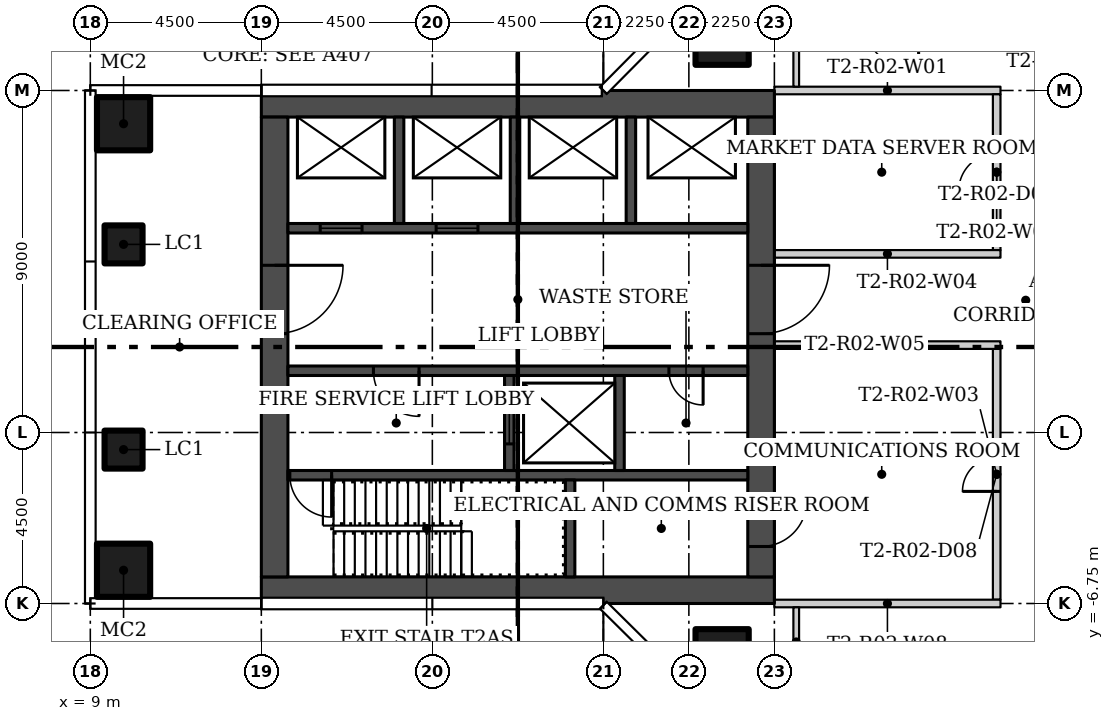
"""IFC4 building model, lengths in metres.
Left out: names, types, materials, properties, quantities, classifications, styles, units other than length and angle.
Written with IfcOpenShell. Run it as: python <this file> out.ifc"""

import sys

from ifc_helpers import new_model, si_unit, direction, frame, frame_2d, origin, origin_2d, place, context, subcontext, project, spatial, rectangle, hollow_rectangle, extrude, element, fill, save


model = new_model("IFC4")
c1 = context("Model", 3, precision=1e-05, world=origin(), true_north=direction((0.0, 1.0)))
c2 = subcontext(c1, "Body", "Model", "MODEL_VIEW")
j1 = project(units=[si_unit("LENGTHUNIT", "METRE"), si_unit("PLANEANGLEUNIT", "RADIAN")], contexts=[c1])
p1 = place(None, origin())
s1 = spatial("IfcSite", under=j1, at=p1, CompositionType="ELEMENT")
p2 = place(p1, origin())
s2 = spatial("IfcBuilding", under=s1, at=p2, CompositionType="ELEMENT")
p3 = place(p2, frame((0.0, 0.0, 33.0)))
s3 = spatial("IfcBuildingStorey", under=s2, at=p3, CompositionType="ELEMENT", Elevation=33.0)
for number, where in (
    (1, (25.625, 8.125, 0.0)),
    (2, (25.625, -8.125, 0.0)),
    (3, (9.875, -5.875, 0.0)),
    (4, (9.875, 5.875, 0.0)),
):
    element("IfcColumn", number, at=place(p3, frame(where)), inside=s3, PredefinedType="COLUMN", context=c2, shape_type="SweptSolid", body=[
        extrude(hollow_rectangle(XDim=1.4, YDim=1.4, WallThickness=0.05, at=origin_2d()), origin(), (0.0, 0.0, 1.0), 4.15),
    ])
for number, where in (
    (5, (9.875, -2.7, 0.0)),
    (6, (9.875, 2.7, 0.0)),
):
    element("IfcColumn", number, at=place(p3, frame(where)), inside=s3, PredefinedType="COLUMN", context=c2, shape_type="SweptSolid", body=[
        extrude(hollow_rectangle(XDim=1.0, YDim=1.0, WallThickness=0.04, at=origin_2d()), origin(), (0.0, 0.0, 1.0), 4.15),
    ])
p4 = place(p3, frame((32.95, 6.75, 0.0), z_axis=(0.0, 0.0, 1.0), x_axis=(-1.0, 0.0, 0.0)))
e7 = element("IfcWall", 7, at=p4, inside=s3, PredefinedType="PARTITIONING", context=c2, shape_type="SweptSolid", body=[
    extrude(rectangle(XDim=5.95, YDim=0.2, at=frame_2d((2.975, 0.0))), origin(), (0.0, 0.0, 1.0), 4.15),
])
p5 = place(p3, frame((32.85, 2.55, 0.0), z_axis=(0.0, 0.0, 1.0), x_axis=(0.0, 1.0, 0.0)))
e8 = element("IfcWall", 8, at=p5, inside=s3, PredefinedType="PARTITIONING", context=c2, shape_type="SweptSolid", body=[
    extrude(rectangle(XDim=4.1, YDim=0.2, at=frame_2d((2.05, 0.0))), origin(), (0.0, 0.0, 1.0), 4.15),
])
p6 = place(p5, frame((1.55, 0.0, 0.0)))
e9 = element("IfcOpeningElement", 9, at=p6, cuts=e8, PredefinedType="OPENING", context=c2, shape_type="SweptSolid", body=[
    extrude(rectangle(XDim=1.0, YDim=2.1, at=frame_2d((0.5, 1.05))), frame((0.0, 0.11, 0.0), z_axis=(0.0, -1.0, 0.0), x_axis=(1.0, 0.0, 0.0)), (0.0, 0.0, 1.0), 0.22),
])
p7 = place(p3, frame((32.85, -6.65, 0.0), z_axis=(0.0, 0.0, 1.0), x_axis=(0.0, 1.0, 0.0)))
e10 = element("IfcWall", 10, at=p7, inside=s3, PredefinedType="PARTITIONING", context=c2, shape_type="SweptSolid", body=[
    extrude(rectangle(XDim=6.6, YDim=0.2, at=frame_2d((3.3, 0.0))), origin(), (0.0, 0.0, 1.0), 4.15),
])
p8 = place(p7, frame((2.85, 0.0, 0.0)))
e11 = element("IfcOpeningElement", 11, at=p8, cuts=e10, PredefinedType="OPENING", context=c2, shape_type="SweptSolid", body=[
    extrude(rectangle(XDim=0.9, YDim=2.1, at=frame_2d((0.45, 1.05))), frame((0.0, 0.11, 0.0), z_axis=(0.0, -1.0, 0.0), x_axis=(1.0, 0.0, 0.0)), (0.0, 0.0, 1.0), 0.22),
])
p9 = place(p3, frame((27.0, 2.45, 0.0)))
e12 = element("IfcWall", 12, at=p9, inside=s3, PredefinedType="PARTITIONING", context=c2, shape_type="SweptSolid", body=[
    extrude(rectangle(XDim=5.95, YDim=0.2, at=frame_2d((2.975, 0.0))), origin(), (0.0, 0.0, 1.0), 4.15),
])
p10 = place(p3, frame((32.95, 0.05, 0.0), z_axis=(0.0, 0.0, 1.0), x_axis=(-1.0, 0.0, 0.0)))
e13 = element("IfcWall", 13, at=p10, inside=s3, PredefinedType="PARTITIONING", context=c2, shape_type="SweptSolid", body=[
    extrude(rectangle(XDim=5.95, YDim=0.2, at=frame_2d((2.975, 0.0))), origin(), (0.0, 0.0, 1.0), 4.15),
])
p11 = place(p3, frame((27.0, -6.75, 0.0)))
e14 = element("IfcWall", 14, at=p11, inside=s3, PredefinedType="PARTITIONING", context=c2, shape_type="SweptSolid", body=[
    extrude(rectangle(XDim=5.95, YDim=0.2, at=frame_2d((2.975, 0.0))), origin(), (0.0, 0.0, 1.0), 4.15),
])
for number, where, z_axis, x_axis in (
    (15, (27.575, -6.85, 0.0), (0.0, 0.0, 1.0), (0.0, -1.0, 0.0)),
    (16, (27.575, 8.675, 0.0), (0.0, 0.0, 1.0), (0.0, -1.0, 0.0)),
):
    element("IfcWall", number, at=place(p3, frame(where, z_axis=z_axis, x_axis=x_axis)), inside=s3, PredefinedType="PARTITIONING", context=c2, shape_type="SweptSolid", body=[
        extrude(rectangle(XDim=1.825, YDim=0.15, at=frame_2d((0.913, 0.0))), origin(), (0.0, 0.0, 1.0), 4.15),
    ])
for number, where in (
    (17, (13.5, -6.4, 0.0)),
    (18, (13.5, 6.4, 0.0)),
):
    element("IfcWall", number, at=place(p3, frame(where)), inside=s3, PredefinedType="SHEAR", context=c2, shape_type="SweptSolid", body=[
        extrude(rectangle(XDim=13.5, YDim=0.7, at=frame_2d((6.75, 0.0))), origin(), (0.0, 0.0, 1.0), 4.15),
    ])
p12 = place(p3, frame((13.85, 6.05, 0.0), z_axis=(0.0, 0.0, 1.0), x_axis=(0.0, -1.0, 0.0)))
e19 = element("IfcWall", 19, at=p12, inside=s3, PredefinedType="SHEAR", context=c2, shape_type="SweptSolid", body=[
    extrude(rectangle(XDim=12.1, YDim=0.7, at=frame_2d((6.05, 0.0))), origin(), (0.0, 0.0, 1.0), 4.15),
])
p13 = place(p12, frame((3.9, 0.0, 0.0)))
e20 = element("IfcOpeningElement", 20, at=p13, cuts=e19, PredefinedType="OPENING", context=c2, shape_type="SweptSolid", body=[
    extrude(rectangle(XDim=1.8, YDim=2.4, at=frame_2d((0.9, 1.2))), frame((0.0, 0.36, 0.0), z_axis=(0.0, -1.0, 0.0), x_axis=(1.0, 0.0, 0.0)), (0.0, 0.0, 1.0), 0.72),
])
p14 = place(p3, frame((26.65, 6.05, 0.0), z_axis=(0.0, 0.0, 1.0), x_axis=(0.0, -1.0, 0.0)))
e21 = element("IfcWall", 21, at=p14, inside=s3, PredefinedType="SHEAR", context=c2, shape_type="SweptSolid", body=[
    extrude(rectangle(XDim=12.1, YDim=0.7, at=frame_2d((6.05, 0.0))), origin(), (0.0, 0.0, 1.0), 4.15),
])
p15 = place(p14, frame((10.1, 0.0, 0.0)))
e22 = element("IfcOpeningElement", 22, at=p15, cuts=e21, PredefinedType="OPENING", context=c2, shape_type="SweptSolid", body=[
    extrude(rectangle(XDim=1.2, YDim=2.1, at=frame_2d((0.6, 1.05))), frame((0.0, 0.36, 0.0), z_axis=(0.0, -1.0, 0.0), x_axis=(1.0, 0.0, 0.0)), (0.0, 0.0, 1.0), 0.72),
])
p16 = place(p14, frame((3.9, 0.0, 0.0)))
e23 = element("IfcOpeningElement", 23, at=p16, cuts=e21, PredefinedType="OPENING", context=c2, shape_type="SweptSolid", body=[
    extrude(rectangle(XDim=1.8, YDim=2.4, at=frame_2d((0.9, 1.2))), frame((0.0, 0.36, 0.0), z_axis=(0.0, -1.0, 0.0), x_axis=(1.0, 0.0, 0.0)), (0.0, 0.0, 1.0), 0.72),
])
p17 = place(p3, frame((26.3, -3.375, 0.0), z_axis=(0.0, 0.0, 1.0), x_axis=(-1.0, 0.0, 0.0)))
e24 = element("IfcWall", 24, at=p17, inside=s3, PredefinedType="SHEAR", context=c2, shape_type="SweptSolid", body=[
    extrude(rectangle(XDim=12.1, YDim=0.25, at=frame_2d((6.05, 0.0))), origin(), (0.0, 0.0, 1.0), 4.15),
])
p18 = place(p17, frame((10.95, 0.0, 0.0)))
e25 = element("IfcOpeningElement", 25, at=p18, cuts=e24, PredefinedType="OPENING", context=c2, shape_type="SweptSolid", body=[
    extrude(rectangle(XDim=1.1, YDim=2.1, at=frame_2d((0.55, 1.05))), frame((0.0, 0.135, 0.0), z_axis=(0.0, -1.0, 0.0), x_axis=(1.0, 0.0, 0.0)), (0.0, 0.0, 1.0), 0.27),
])
p19 = place(p3, frame((21.625, -6.05, 0.0), z_axis=(0.0, 0.0, 1.0), x_axis=(0.0, 1.0, 0.0)))
e26 = element("IfcWall", 26, at=p19, inside=s3, PredefinedType="SHEAR", context=c2, shape_type="SweptSolid", body=[
    extrude(rectangle(XDim=2.55, YDim=0.25, at=frame_2d((1.275, 0.0))), origin(), (0.0, 0.0, 1.0), 4.15),
])
p20 = place(p3, frame((26.3, -0.625, 0.0), z_axis=(0.0, 0.0, 1.0), x_axis=(-1.0, 0.0, 0.0)))
e27 = element("IfcWall", 27, at=p20, inside=s3, PredefinedType="SHEAR", context=c2, shape_type="SweptSolid", body=[
    extrude(rectangle(XDim=12.1, YDim=0.25, at=frame_2d((6.05, 0.0))), origin(), (0.0, 0.0, 1.0), 4.15),
])
p21 = place(p20, frame((8.65, 0.0, 0.0)))
e28 = element("IfcOpeningElement", 28, at=p21, cuts=e27, PredefinedType="OPENING", context=c2, shape_type="SweptSolid", body=[
    extrude(rectangle(XDim=1.2, YDim=2.1, at=frame_2d((0.6, 1.05))), frame((0.0, 0.135, 0.0), z_axis=(0.0, -1.0, 0.0), x_axis=(1.0, 0.0, 0.0)), (0.0, 0.0, 1.0), 0.27),
])
p22 = place(p20, frame((1.175, 0.0, 0.0)))
e29 = element("IfcOpeningElement", 29, at=p22, cuts=e27, PredefinedType="OPENING", context=c2, shape_type="SweptSolid", body=[
    extrude(rectangle(XDim=0.9, YDim=2.1, at=frame_2d((0.45, 1.05))), frame((0.0, 0.135, 0.0), z_axis=(0.0, -1.0, 0.0), x_axis=(1.0, 0.0, 0.0)), (0.0, 0.0, 1.0), 0.27),
])
p23 = place(p3, frame((20.025, -3.25, 0.0), z_axis=(0.0, 0.0, 1.0), x_axis=(0.0, 1.0, 0.0)))
e30 = element("IfcWall", 30, at=p23, inside=s3, PredefinedType="SHEAR", context=c2, shape_type="SweptSolid", body=[
    extrude(rectangle(XDim=2.5, YDim=0.25, at=frame_2d((1.25, 0.0))), origin(), (0.0, 0.0, 1.0), 4.15),
])
p24 = place(p23, frame((0.7, 0.0, 0.0)))
e31 = element("IfcOpeningElement", 31, at=p24, cuts=e30, PredefinedType="OPENING", context=c2, shape_type="SweptSolid", body=[
    extrude(rectangle(XDim=1.1, YDim=2.1, at=frame_2d((0.55, 1.05))), frame((0.0, 0.135, 0.0), z_axis=(0.0, -1.0, 0.0), x_axis=(1.0, 0.0, 0.0)), (0.0, 0.0, 1.0), 0.27),
])
p25 = place(p3, frame((22.925, -3.25, 0.0), z_axis=(0.0, 0.0, 1.0), x_axis=(0.0, 1.0, 0.0)))
e32 = element("IfcWall", 32, at=p25, inside=s3, PredefinedType="SHEAR", context=c2, shape_type="SweptSolid", body=[
    extrude(rectangle(XDim=2.5, YDim=0.25, at=frame_2d((1.25, 0.0))), origin(), (0.0, 0.0, 1.0), 4.15),
])
p26 = place(p3, frame((14.2, 3.125, 0.0)))
e33 = element("IfcWall", 33, at=p26, inside=s3, PredefinedType="SHEAR", context=c2, shape_type="SweptSolid", body=[
    extrude(rectangle(XDim=12.1, YDim=0.25, at=frame_2d((6.05, 0.0))), origin(), (0.0, 0.0, 1.0), 4.15),
])
p27 = place(p26, frame((0.85, 0.0, 0.0)))
e34 = element("IfcOpeningElement", 34, at=p27, cuts=e33, PredefinedType="OPENING", context=c2, shape_type="SweptSolid", body=[
    extrude(rectangle(XDim=1.1, YDim=2.1, at=frame_2d((0.55, 1.05))), frame((0.0, 0.135, 0.0), z_axis=(0.0, -1.0, 0.0), x_axis=(1.0, 0.0, 0.0)), (0.0, 0.0, 1.0), 0.27),
])
p28 = place(p26, frame((3.9, 0.0, 0.0)))
e35 = element("IfcOpeningElement", 35, at=p28, cuts=e33, PredefinedType="OPENING", context=c2, shape_type="SweptSolid", body=[
    extrude(rectangle(XDim=1.1, YDim=2.1, at=frame_2d((0.55, 1.05))), frame((0.0, 0.135, 0.0), z_axis=(0.0, -1.0, 0.0), x_axis=(1.0, 0.0, 0.0)), (0.0, 0.0, 1.0), 0.27),
])
for number, where, z_axis, x_axis in (
    (36, (17.125, 3.25, 0.0), (0.0, 0.0, 1.0), (0.0, 1.0, 0.0)),
    (37, (20.175, 3.25, 0.0), (0.0, 0.0, 1.0), (0.0, 1.0, 0.0)),
    (38, (23.225, 3.25, 0.0), (0.0, 0.0, 1.0), (0.0, 1.0, 0.0)),
):
    element("IfcWall", number, at=place(p3, frame(where, z_axis=z_axis, x_axis=x_axis)), inside=s3, PredefinedType="SHEAR", context=c2, shape_type="SweptSolid", body=[
        extrude(rectangle(XDim=2.8, YDim=0.25, at=frame_2d((1.4, 0.0))), origin(), (0.0, 0.0, 1.0), 4.15),
    ])
p29 = place(p8, origin())
e39 = element("IfcDoor", 39, at=p29, inside=s3, OperationType="SINGLE_SWING_RIGHT", PredefinedType="DOOR", context=c2, shape_type="SweptSolid", body=[
    extrude(rectangle(XDim=0.9, YDim=2.1, at=frame_2d((0.45, 1.05))), frame((0.0, 0.025, 0.0), z_axis=(0.0, -1.0, 0.0), x_axis=(1.0, 0.0, 0.0)), (0.0, 0.0, 1.0), 0.05),
])
fill(e11, e39)
p30 = place(p6, origin())
e40 = element("IfcDoor", 40, at=p30, inside=s3, OperationType="SINGLE_SWING_RIGHT", PredefinedType="DOOR", context=c2, shape_type="SweptSolid", body=[
    extrude(rectangle(XDim=1.0, YDim=2.1, at=frame_2d((0.5, 1.05))), frame((0.0, 0.025, 0.0), z_axis=(0.0, -1.0, 0.0), x_axis=(1.0, 0.0, 0.0)), (0.0, 0.0, 1.0), 0.05),
])
fill(e9, e40)
p31 = place(p13, origin())
e41 = element("IfcDoor", 41, at=p31, inside=s3, OperationType="DOUBLE_DOOR_SINGLE_SWING", PredefinedType="DOOR", context=c2, shape_type="SweptSolid", body=[
    extrude(rectangle(XDim=1.8, YDim=2.4, at=frame_2d((0.9, 1.2))), frame((0.0, 0.025, 0.0), z_axis=(0.0, -1.0, 0.0), x_axis=(1.0, 0.0, 0.0)), (0.0, 0.0, 1.0), 0.05),
])
fill(e20, e41)
p32 = place(p15, origin())
e42 = element("IfcDoor", 42, at=p32, inside=s3, OperationType="SINGLE_SWING_RIGHT", PredefinedType="DOOR", context=c2, shape_type="SweptSolid", body=[
    extrude(rectangle(XDim=1.2, YDim=2.1, at=frame_2d((0.6, 1.05))), frame((0.0, 0.025, 0.0), z_axis=(0.0, -1.0, 0.0), x_axis=(1.0, 0.0, 0.0)), (0.0, 0.0, 1.0), 0.05),
])
fill(e22, e42)
p33 = place(p16, origin())
e43 = element("IfcDoor", 43, at=p33, inside=s3, OperationType="DOUBLE_DOOR_SINGLE_SWING", PredefinedType="DOOR", context=c2, shape_type="SweptSolid", body=[
    extrude(rectangle(XDim=1.8, YDim=2.4, at=frame_2d((0.9, 1.2))), frame((0.0, 0.025, 0.0), z_axis=(0.0, -1.0, 0.0), x_axis=(1.0, 0.0, 0.0)), (0.0, 0.0, 1.0), 0.05),
])
fill(e23, e43)
p34 = place(p18, origin())
e44 = element("IfcDoor", 44, at=p34, inside=s3, OperationType="SINGLE_SWING_RIGHT", PredefinedType="DOOR", context=c2, shape_type="SweptSolid", body=[
    extrude(rectangle(XDim=1.1, YDim=2.1, at=frame_2d((0.55, 1.05))), frame((0.0, 0.025, 0.0), z_axis=(0.0, -1.0, 0.0), x_axis=(1.0, 0.0, 0.0)), (0.0, 0.0, 1.0), 0.05),
])
fill(e25, e44)
p35 = place(p21, origin())
e45 = element("IfcDoor", 45, at=p35, inside=s3, OperationType="SINGLE_SWING_RIGHT", PredefinedType="DOOR", context=c2, shape_type="SweptSolid", body=[
    extrude(rectangle(XDim=1.2, YDim=2.1, at=frame_2d((0.6, 1.05))), frame((0.0, 0.025, 0.0), z_axis=(0.0, -1.0, 0.0), x_axis=(1.0, 0.0, 0.0)), (0.0, 0.0, 1.0), 0.05),
])
fill(e28, e45)
p36 = place(p22, origin())
e46 = element("IfcDoor", 46, at=p36, inside=s3, OperationType="SINGLE_SWING_LEFT", PredefinedType="DOOR", context=c2, shape_type="SweptSolid", body=[
    extrude(rectangle(XDim=0.9, YDim=2.1, at=frame_2d((0.45, 1.05))), frame((0.0, 0.025, 0.0), z_axis=(0.0, -1.0, 0.0), x_axis=(1.0, 0.0, 0.0)), (0.0, 0.0, 1.0), 0.05),
])
fill(e29, e46)
p37 = place(p24, origin())
e47 = element("IfcDoor", 47, at=p37, inside=s3, OperationType="SLIDING_TO_LEFT", PredefinedType="DOOR", context=c2, shape_type="SweptSolid", body=[
    extrude(rectangle(XDim=1.1, YDim=2.1, at=frame_2d((0.55, 1.05))), frame((0.0, 0.025, 0.0), z_axis=(0.0, -1.0, 0.0), x_axis=(1.0, 0.0, 0.0)), (0.0, 0.0, 1.0), 0.05),
])
fill(e31, e47)
p38 = place(p27, origin())
e48 = element("IfcDoor", 48, at=p38, inside=s3, OperationType="SLIDING_TO_LEFT", PredefinedType="DOOR", context=c2, shape_type="SweptSolid", body=[
    extrude(rectangle(XDim=1.1, YDim=2.1, at=frame_2d((0.55, 1.05))), frame((0.0, 0.025, 0.0), z_axis=(0.0, -1.0, 0.0), x_axis=(1.0, 0.0, 0.0)), (0.0, 0.0, 1.0), 0.05),
])
fill(e34, e48)
p39 = place(p28, origin())
e49 = element("IfcDoor", 49, at=p39, inside=s3, OperationType="SLIDING_TO_LEFT", PredefinedType="DOOR", context=c2, shape_type="SweptSolid", body=[
    extrude(rectangle(XDim=1.1, YDim=2.1, at=frame_2d((0.55, 1.05))), frame((0.0, 0.025, 0.0), z_axis=(0.0, -1.0, 0.0), x_axis=(1.0, 0.0, 0.0)), (0.0, 0.0, 1.0), 0.05),
])
fill(e35, e49)
save(model, sys.argv[1])
